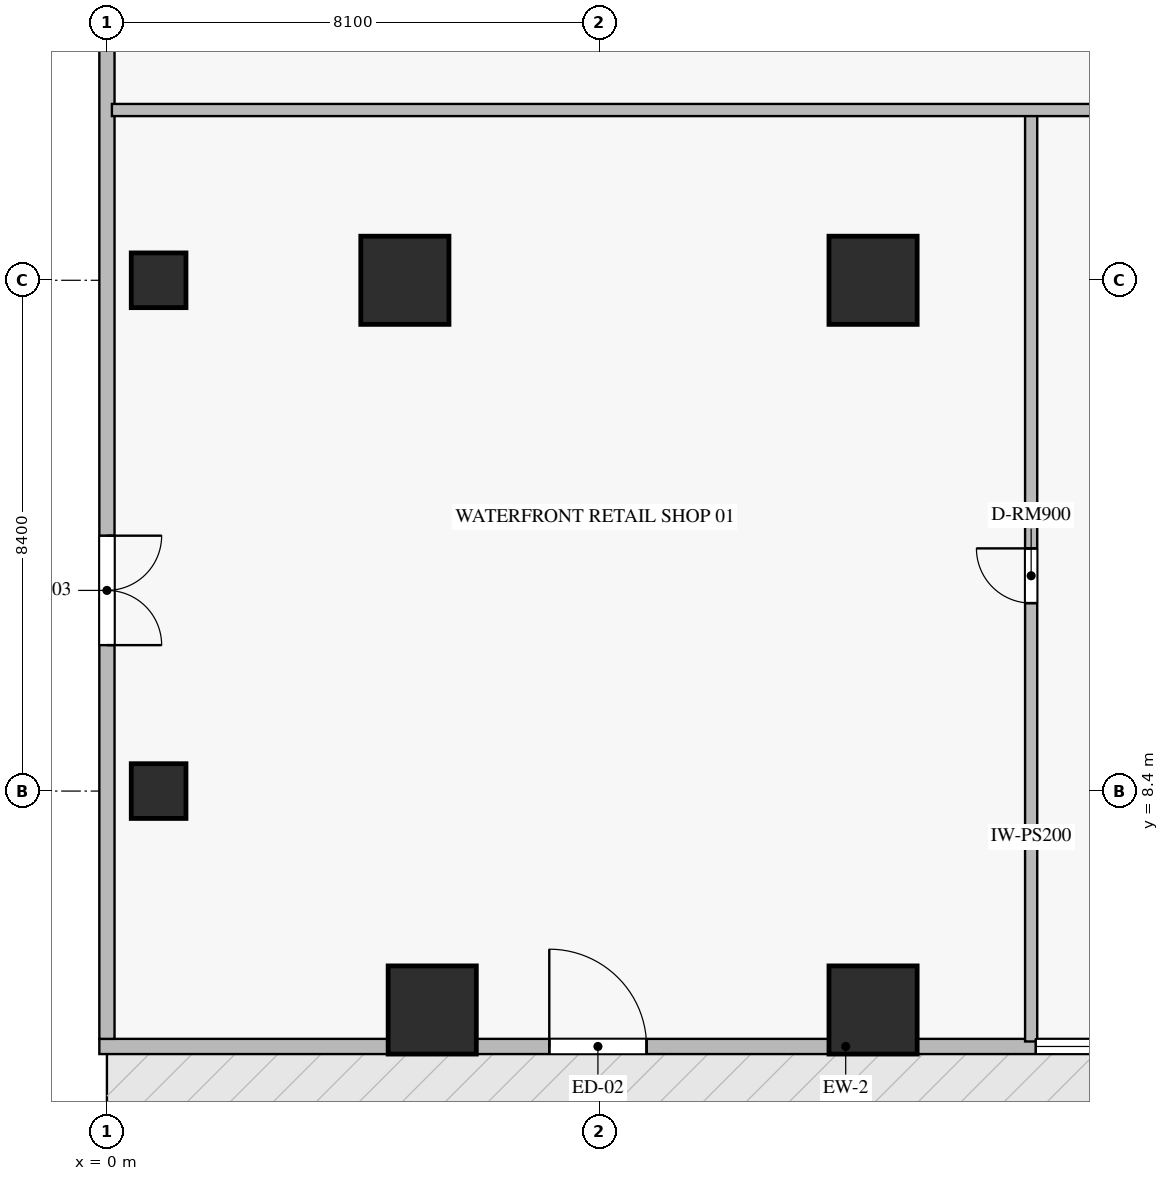
"""IFC4 building model, lengths in metres.
Left out: names, types, materials, properties, quantities, classifications, styles, units other than length and angle.
Written with IfcOpenShell. Run it as: python <this file> out.ifc"""

import sys

from ifc_helpers import new_model, si_unit, direction, frame, frame_2d, origin, origin_2d, place, context, subcontext, project, spatial, rectangle, extrude, source, transform, mapped, element, fill, save


model = new_model("IFC4")
c1 = context("Model", 3, precision=1e-05, world=origin(), true_north=direction((0.0, 1.0)))
c2 = subcontext(c1, "Body", "Model", "MODEL_VIEW")
j1 = project(units=[si_unit("LENGTHUNIT", "METRE"), si_unit("PLANEANGLEUNIT", "RADIAN")], contexts=[c1])
p1 = place(None, origin())
s1 = spatial("IfcSite", under=j1, at=p1, CompositionType="ELEMENT")
p2 = place(p1, origin())
s2 = spatial("IfcBuilding", under=s1, at=p2, CompositionType="ELEMENT")
p3 = place(p2, origin())
s3 = spatial("IfcBuildingStorey", under=s2, at=p3, CompositionType="ELEMENT", Elevation=0.0)
m1 = source(origin(), c2, "Body", "SweptSolid", [
    extrude(rectangle(XDim=0.9, YDim=0.9, at=origin_2d()), origin(), (0.0, 0.0, 1.0), 5.5),
])
for number, where, z_axis, x_axis in (
    (1, (0.85, 8.4, -0.38), (0.0, 0.0, 1.0), (1.0, 0.0, 0.0)),
    (2, (0.85, 16.8, -0.38), (0.0, 0.0, 1.0), (1.0, 0.0, 0.0)),
):
    element("IfcColumn", number, at=place(p3, frame(where, z_axis=z_axis, x_axis=x_axis)), inside=s3, PredefinedType="COLUMN", context=c2, shape_type="MappedRepresentation", body=[
        mapped(m1, transform((0.0, 0.0, 0.0), scale=1.0)),
    ])
m2 = source(origin(), c2, "Body", "SweptSolid", [
    extrude(rectangle(XDim=1.45, YDim=1.45, at=origin_2d()), origin(), (0.0, 0.0, 1.0), 5.5),
])
for number, where, z_axis, x_axis in (
    (3, (12.6, 4.8, -0.38), (0.0, 0.0, 1.0), (1.0, 0.0, 0.0)),
    (4, (12.6, 16.8, -0.38), (0.0, 0.0, 1.0), (1.0, 0.0, 0.0)),
    (5, (4.9, 16.8, -0.38), (0.0, 0.0, 1.0), (1.0, 0.0, 0.0)),
    (6, (5.35, 4.8, -0.38), (0.0, 0.0, 1.0), (1.0, 0.0, 0.0)),
):
    element("IfcColumn", number, at=place(p3, frame(where, z_axis=z_axis, x_axis=x_axis)), inside=s3, PredefinedType="COLUMN", context=c2, shape_type="MappedRepresentation", body=[
        mapped(m2, transform((0.0, 0.0, 0.0), scale=1.0)),
    ])
p4 = place(p3, frame((-0.125, 4.2, 0.0), z_axis=(0.0, 0.0, 1.0), x_axis=(1.0, 0.0, 0.0)))
e7 = element("IfcWall", 7, at=p4, inside=s3, PredefinedType="ELEMENTEDWALL", context=c2, shape_type="SweptSolid", body=[
    extrude(rectangle(XDim=24.55, YDim=0.25, at=frame_2d((12.275, 0.0))), origin(), (0.0, 0.0, 1.0), 5.105),
])
p5 = place(p4, frame((7.4, 0.0, 0.0)))
e8 = element("IfcOpeningElement", 8, at=p5, cuts=e7, PredefinedType="OPENING", context=c2, shape_type="SweptSolid", body=[
    extrude(rectangle(XDim=1.6, YDim=2.4, at=frame_2d((0.8, 1.2))), frame((0.0, 0.135, 0.0), z_axis=(0.0, -1.0, 0.0), x_axis=(1.0, 0.0, 0.0)), (0.0, 0.0, 1.0), 0.27),
])
p6 = place(p4, frame((15.4, 0.0, 0.4)))
e9 = element("IfcOpeningElement", 9, at=p6, cuts=e7, PredefinedType="OPENING", context=c2, shape_type="SweptSolid", body=[
    extrude(rectangle(XDim=2.8, YDim=3.0, at=frame_2d((1.4, 1.5))), frame((0.0, 0.135, 0.0), z_axis=(0.0, -1.0, 0.0), x_axis=(1.0, 0.0, 0.0)), (0.0, 0.0, 1.0), 0.27),
])
p7 = place(p3, frame((0.0, 46.075, 0.0), z_axis=(0.0, 0.0, 1.0), x_axis=(0.0, -1.0, 0.0)))
e10 = element("IfcWall", 10, at=p7, inside=s3, PredefinedType="ELEMENTEDWALL", context=c2, shape_type="SweptSolid", body=[
    extrude(rectangle(XDim=41.75, YDim=0.25, at=frame_2d((20.875, 0.0))), origin(), (0.0, 0.0, 1.0), 5.105),
])
p8 = place(p7, frame((21.975, 0.0, 0.0)))
e11 = element("IfcOpeningElement", 11, at=p8, cuts=e10, PredefinedType="OPENING", context=c2, shape_type="SweptSolid", body=[
    extrude(rectangle(XDim=1.8, YDim=2.3, at=frame_2d((0.9, 1.15))), frame((0.0, 0.135, 0.0), z_axis=(0.0, -1.0, 0.0), x_axis=(1.0, 0.0, 0.0)), (0.0, 0.0, 1.0), 0.27),
])
p9 = place(p7, frame((33.475, 0.0, 0.0)))
e12 = element("IfcOpeningElement", 12, at=p9, cuts=e10, PredefinedType="OPENING", context=c2, shape_type="SweptSolid", body=[
    extrude(rectangle(XDim=1.8, YDim=2.3, at=frame_2d((0.9, 1.15))), frame((0.0, 0.135, 0.0), z_axis=(0.0, -1.0, 0.0), x_axis=(1.0, 0.0, 0.0)), (0.0, 0.0, 1.0), 0.27),
])
p10 = place(p3, frame((15.2, 4.282, 0.0), z_axis=(0.0, 0.0, 1.0), x_axis=(0.0, 1.0, 0.0)))
e13 = element("IfcWall", 13, at=p10, inside=s3, PredefinedType="STANDARD", context=c2, shape_type="SweptSolid", body=[
    extrude(rectangle(XDim=15.318, YDim=0.2, at=frame_2d((7.659, 0.0))), origin(), (0.0, 0.0, 1.0), 5.12),
])
p11 = place(p10, frame((7.209, 0.0, 0.0)))
e14 = element("IfcOpeningElement", 14, at=p11, cuts=e13, PredefinedType="OPENING", context=c2, shape_type="SweptSolid", body=[
    extrude(rectangle(XDim=0.9, YDim=2.1, at=frame_2d((0.45, 1.05))), frame((0.0, 0.11, 0.0), z_axis=(0.0, -1.0, 0.0), x_axis=(1.0, 0.0, 0.0)), (0.0, 0.0, 1.0), 0.22),
])
p12 = place(p3, frame((0.082, 19.6, 0.0), z_axis=(0.0, 0.0, 1.0), x_axis=(1.0, 0.0, 0.0)))
e15 = element("IfcWall", 15, at=p12, inside=s3, PredefinedType="STANDARD", context=c2, shape_type="SweptSolid", body=[
    extrude(rectangle(XDim=21.418, YDim=0.2, at=frame_2d((10.709, 0.0))), origin(), (0.0, 0.0, 1.0), 5.12),
])
m3 = source(origin(), c2, "Body", "SweptSolid", [
    extrude(rectangle(XDim=1.6, YDim=2.4, at=frame_2d((0.8, 1.2))), frame((0.0, 0.025, 0.0), z_axis=(0.0, -1.0, 0.0), x_axis=(1.0, 0.0, 0.0)), (0.0, 0.0, 1.0), 0.05),
])
p13 = place(p5, origin())
e16 = element("IfcDoor", 16, at=p13, inside=s3, OperationType="SINGLE_SWING_LEFT", PredefinedType="DOOR", context=c2, shape_type="MappedRepresentation", body=[
    mapped(m3, transform((0.0, 0.0, 0.0), scale=1.0)),
])
fill(e8, e16)
m4 = source(origin(), c2, "Body", "SweptSolid", [
    extrude(rectangle(XDim=2.8, YDim=3.0, at=frame_2d((1.4, 1.5))), frame((0.0, 0.03, 0.0), z_axis=(0.0, -1.0, 0.0), x_axis=(1.0, 0.0, 0.0)), (0.0, 0.0, 1.0), 0.06),
])
p14 = place(p6, origin())
e17 = element("IfcWindow", 17, at=p14, inside=s3, PartitioningType="SINGLE_PANEL", PredefinedType="WINDOW", context=c2, shape_type="MappedRepresentation", body=[
    mapped(m4, transform((0.0, 0.0, 0.0), scale=1.0)),
])
fill(e9, e17)
m5 = source(origin(), c2, "Body", "SweptSolid", [
    extrude(rectangle(XDim=1.8, YDim=2.3, at=frame_2d((0.9, 1.15))), frame((0.0, 0.025, 0.0), z_axis=(0.0, -1.0, 0.0), x_axis=(1.0, 0.0, 0.0)), (0.0, 0.0, 1.0), 0.05),
])
p15 = place(p9, frame((1.8, 0.0, 0.0), z_axis=(0.0, 0.0, 1.0), x_axis=(-1.0, 0.0, 0.0)))
e18 = element("IfcDoor", 18, at=p15, inside=s3, OperationType="DOUBLE_DOOR_SINGLE_SWING", PredefinedType="DOOR", context=c2, shape_type="MappedRepresentation", body=[
    mapped(m5, transform((0.0, 0.0, 0.0), scale=1.0)),
])
fill(e12, e18)
m6 = source(origin(), c2, "Body", "SweptSolid", [
    extrude(rectangle(XDim=0.9, YDim=2.1, at=frame_2d((0.45, 1.05))), frame((0.0, 0.025, 0.0), z_axis=(0.0, -1.0, 0.0), x_axis=(1.0, 0.0, 0.0)), (0.0, 0.0, 1.0), 0.05),
])
p16 = place(p11, origin())
e19 = element("IfcDoor", 19, at=p16, inside=s3, OperationType="SINGLE_SWING_RIGHT", PredefinedType="DOOR", context=c2, shape_type="MappedRepresentation", body=[
    mapped(m6, transform((0.0, 0.0, 0.0), scale=1.0)),
])
fill(e14, e19)
save(model, sys.argv[1])
